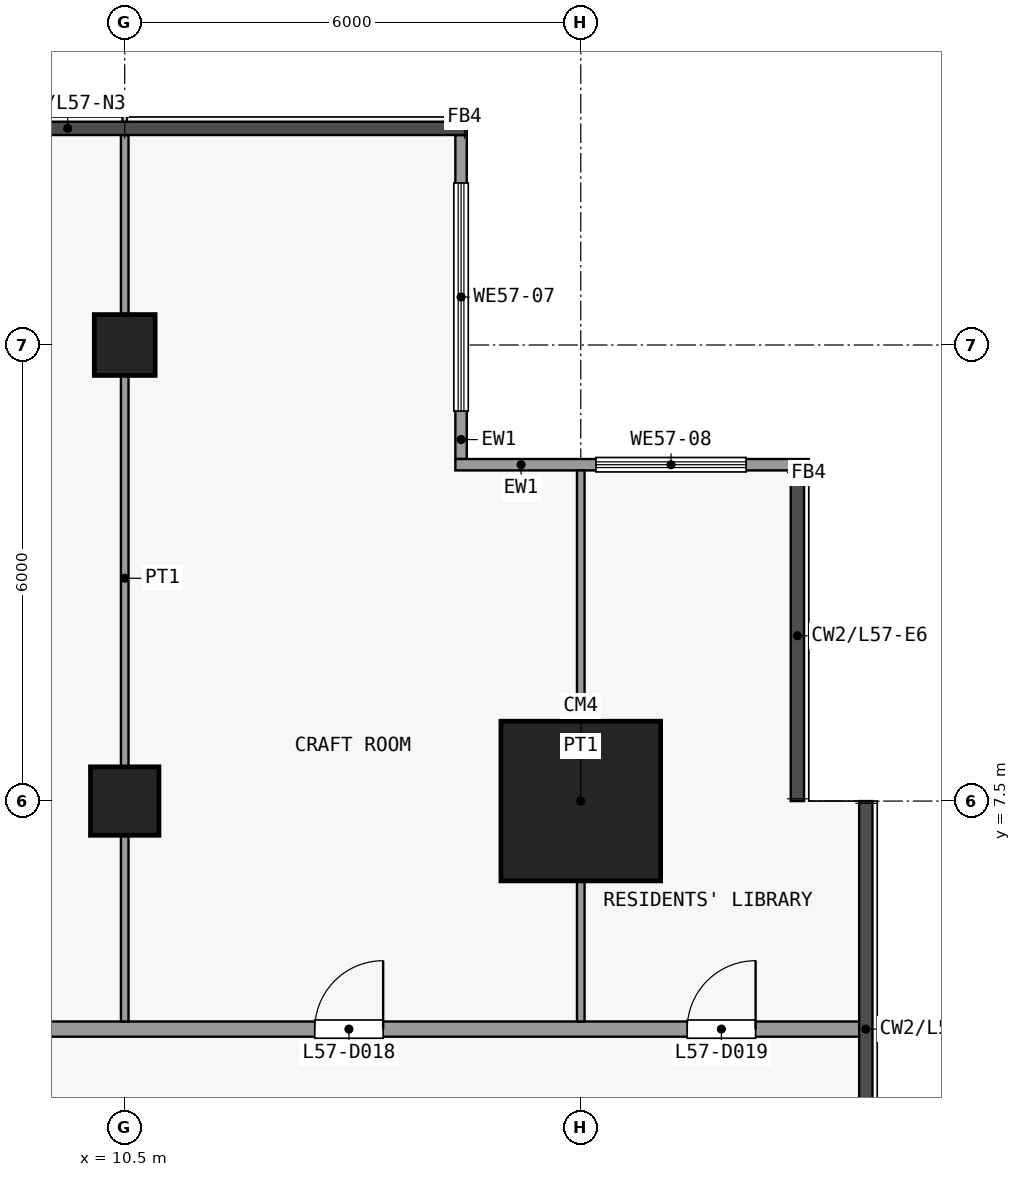
"""IFC4 building model, lengths in metres.
Left out: names, types, materials, properties, quantities, classifications, styles, units other than length and angle.
Written with IfcOpenShell. Run it as: python <this file> out.ifc"""

import sys

from ifc_helpers import new_model, si_unit, direction, frame, frame_2d, origin, origin_2d, place, context, subcontext, project, spatial, rectangle, extrude, element, fill, save


model = new_model("IFC4")
c1 = context("Model", 3, precision=1e-05, world=origin(), true_north=direction((0.0, 1.0)))
c2 = subcontext(c1, "Body", "Model", "MODEL_VIEW")
j1 = project(units=[si_unit("LENGTHUNIT", "METRE"), si_unit("PLANEANGLEUNIT", "RADIAN")], contexts=[c1])
p1 = place(None, origin())
s1 = spatial("IfcSite", under=j1, at=p1, CompositionType="ELEMENT")
p2 = place(p1, origin())
s2 = spatial("IfcBuilding", under=s1, at=p2, CompositionType="ELEMENT")
p3 = place(p2, frame((0.0, 0.0, 226.7)))
s3 = spatial("IfcBuildingStorey", under=s2, at=p3, CompositionType="ELEMENT", Elevation=226.7)
p4 = place(p3, frame((10.5, 7.5, 0.0), z_axis=(0.0, 0.0, 1.0), x_axis=(1.0, 0.0, 0.0)))
e1 = element("IfcColumn", 1, at=p4, inside=s3, PredefinedType="COLUMN", context=c2, shape_type="SweptSolid", body=[
    extrude(rectangle(XDim=0.9, YDim=0.9, at=origin_2d()), origin(), (0.0, 0.0, 1.0), 3.6),
])
p5 = place(p3, frame((10.5, 13.5, 0.0), z_axis=(0.0, 0.0, 1.0), x_axis=(1.0, 0.0, 0.0)))
e2 = element("IfcColumn", 2, at=p5, inside=s3, PredefinedType="COLUMN", context=c2, shape_type="SweptSolid", body=[
    extrude(rectangle(XDim=0.8, YDim=0.8, at=origin_2d()), origin(), (0.0, 0.0, 1.0), 3.6),
])
p6 = place(p3, frame((16.5, 7.5, 0.0), z_axis=(0.0, 0.0, 1.0), x_axis=(1.0, 0.0, 0.0)))
e3 = element("IfcColumn", 3, at=p6, inside=s3, PredefinedType="COLUMN", context=c2, shape_type="SweptSolid", body=[
    extrude(rectangle(XDim=2.1, YDim=2.1, at=origin_2d()), origin(), (0.0, 0.0, 1.0), 3.6),
])
p7 = place(p3, frame((14.925, 16.262, 0.0), z_axis=(0.0, 0.0, 1.0), x_axis=(0.0, -1.0, 0.0)))
e4 = element("IfcWall", 4, at=p7, inside=s3, PredefinedType="SOLIDWALL", context=c2, shape_type="SweptSolid", body=[
    extrude(rectangle(XDim=4.262, YDim=0.15, at=frame_2d((2.131, 0.0))), origin(), (0.0, 0.0, 1.0), 3.3),
])
p8 = place(p7, frame((0.631, 0.0, 0.9)))
e5 = element("IfcOpeningElement", 5, at=p8, cuts=e4, PredefinedType="OPENING", context=c2, shape_type="SweptSolid", body=[
    extrude(rectangle(XDim=3.0, YDim=2.4, at=frame_2d((1.5, 1.2))), frame((0.0, 0.085, 0.0), z_axis=(0.0, -1.0, 0.0), x_axis=(1.0, 0.0, 0.0)), (0.0, 0.0, 1.0), 0.17),
])
p9 = place(p3, frame((14.85, 11.925, 0.0), z_axis=(0.0, 0.0, 1.0), x_axis=(1.0, 0.0, 0.0)))
e6 = element("IfcWall", 6, at=p9, inside=s3, PredefinedType="SOLIDWALL", context=c2, shape_type="SweptSolid", body=[
    extrude(rectangle(XDim=4.65, YDim=0.15, at=frame_2d((2.325, 0.0))), origin(), (0.0, 0.0, 1.0), 3.3),
])
p10 = place(p9, frame((1.85, 0.0, 0.9)))
e7 = element("IfcOpeningElement", 7, at=p10, cuts=e6, PredefinedType="OPENING", context=c2, shape_type="SweptSolid", body=[
    extrude(rectangle(XDim=1.975, YDim=2.4, at=frame_2d((0.988, 1.2))), frame((0.0, 0.085, 0.0), z_axis=(0.0, -1.0, 0.0), x_axis=(1.0, 0.0, 0.0)), (0.0, 0.0, 1.0), 0.17),
])
p11 = place(p3, frame((-19.35, 4.5, 0.0), z_axis=(0.0, 0.0, 1.0), x_axis=(1.0, 0.0, 0.0)))
e8 = element("IfcWall", 8, at=p11, inside=s3, PredefinedType="PARTITIONING", context=c2, shape_type="SweptSolid", body=[
    extrude(rectangle(XDim=39.6, YDim=0.2, at=frame_2d((19.8, 0.0))), origin(), (0.0, 0.0, 1.0), 3.3),
])
p12 = place(p11, frame((13.05, 0.0, 0.0)))
e9 = element("IfcOpeningElement", 9, at=p12, cuts=e8, PredefinedType="OPENING", context=c2, shape_type="SweptSolid", body=[
    extrude(rectangle(XDim=1.0, YDim=2.1, at=frame_2d((0.5, 1.05))), frame((0.0, 0.11, 0.0), z_axis=(0.0, -1.0, 0.0), x_axis=(1.0, 0.0, 0.0)), (0.0, 0.0, 1.0), 0.22),
])
p13 = place(p11, frame((26.35, 0.0, 0.0)))
e10 = element("IfcOpeningElement", 10, at=p13, cuts=e8, PredefinedType="OPENING", context=c2, shape_type="SweptSolid", body=[
    extrude(rectangle(XDim=0.9, YDim=2.1, at=frame_2d((0.45, 1.05))), frame((0.0, 0.11, 0.0), z_axis=(0.0, -1.0, 0.0), x_axis=(1.0, 0.0, 0.0)), (0.0, 0.0, 1.0), 0.22),
])
p14 = place(p11, frame((32.35, 0.0, 0.0)))
e11 = element("IfcOpeningElement", 11, at=p14, cuts=e8, PredefinedType="OPENING", context=c2, shape_type="SweptSolid", body=[
    extrude(rectangle(XDim=0.9, YDim=2.1, at=frame_2d((0.45, 1.05))), frame((0.0, 0.11, 0.0), z_axis=(0.0, -1.0, 0.0), x_axis=(1.0, 0.0, 0.0)), (0.0, 0.0, 1.0), 0.22),
])
p15 = place(p11, frame((37.25, 0.0, 0.0)))
e12 = element("IfcOpeningElement", 12, at=p15, cuts=e8, PredefinedType="OPENING", context=c2, shape_type="SweptSolid", body=[
    extrude(rectangle(XDim=0.9, YDim=2.1, at=frame_2d((0.45, 1.05))), frame((0.0, 0.11, 0.0), z_axis=(0.0, -1.0, 0.0), x_axis=(1.0, 0.0, 0.0)), (0.0, 0.0, 1.0), 0.22),
])
p16 = place(p3, frame((10.5, 4.6, 0.0), z_axis=(0.0, 0.0, 1.0), x_axis=(0.0, 1.0, 0.0)))
e13 = element("IfcWall", 13, at=p16, inside=s3, PredefinedType="PARTITIONING", context=c2, shape_type="SweptSolid", body=[
    extrude(rectangle(XDim=11.662, YDim=0.1, at=frame_2d((5.831, 0.0))), origin(), (0.0, 0.0, 1.0), 3.3),
])
p17 = place(p3, frame((16.5, 4.6, 0.0), z_axis=(0.0, 0.0, 1.0), x_axis=(0.0, 1.0, 0.0)))
e14 = element("IfcWall", 14, at=p17, inside=s3, PredefinedType="PARTITIONING", context=c2, shape_type="SweptSolid", body=[
    extrude(rectangle(XDim=7.25, YDim=0.1, at=frame_2d((3.625, 0.0))), origin(), (0.0, 0.0, 1.0), 3.3),
])
p18 = place(p8, origin())
e15 = element("IfcWindow", 15, at=p18, inside=s3, PartitioningType="SINGLE_PANEL", PredefinedType="WINDOW", context=c2, shape_type="SweptSolid", body=[
    extrude(rectangle(XDim=3.0, YDim=2.4, at=frame_2d((1.5, 1.2))), frame((0.0, 0.03, 0.0), z_axis=(0.0, -1.0, 0.0), x_axis=(1.0, 0.0, 0.0)), (0.0, 0.0, 1.0), 0.06),
])
fill(e5, e15)
p19 = place(p10, origin())
e16 = element("IfcWindow", 16, at=p19, inside=s3, PartitioningType="SINGLE_PANEL", PredefinedType="WINDOW", context=c2, shape_type="SweptSolid", body=[
    extrude(rectangle(XDim=1.975, YDim=2.4, at=frame_2d((0.988, 1.2))), frame((0.0, 0.03, 0.0), z_axis=(0.0, -1.0, 0.0), x_axis=(1.0, 0.0, 0.0)), (0.0, 0.0, 1.0), 0.06),
])
fill(e7, e16)
p20 = place(p14, origin())
e17 = element("IfcDoor", 17, at=p20, inside=s3, OperationType="SINGLE_SWING_LEFT", PredefinedType="DOOR", context=c2, shape_type="SweptSolid", body=[
    extrude(rectangle(XDim=0.9, YDim=2.1, at=frame_2d((0.45, 1.05))), frame((0.0, 0.025, 0.0), z_axis=(0.0, -1.0, 0.0), x_axis=(1.0, 0.0, 0.0)), (0.0, 0.0, 1.0), 0.05),
])
fill(e11, e17)
p21 = place(p15, origin())
e18 = element("IfcDoor", 18, at=p21, inside=s3, OperationType="SINGLE_SWING_LEFT", PredefinedType="DOOR", context=c2, shape_type="SweptSolid", body=[
    extrude(rectangle(XDim=0.9, YDim=2.1, at=frame_2d((0.45, 1.05))), frame((0.0, 0.025, 0.0), z_axis=(0.0, -1.0, 0.0), x_axis=(1.0, 0.0, 0.0)), (0.0, 0.0, 1.0), 0.05),
])
fill(e12, e18)
save(model, sys.argv[1])
